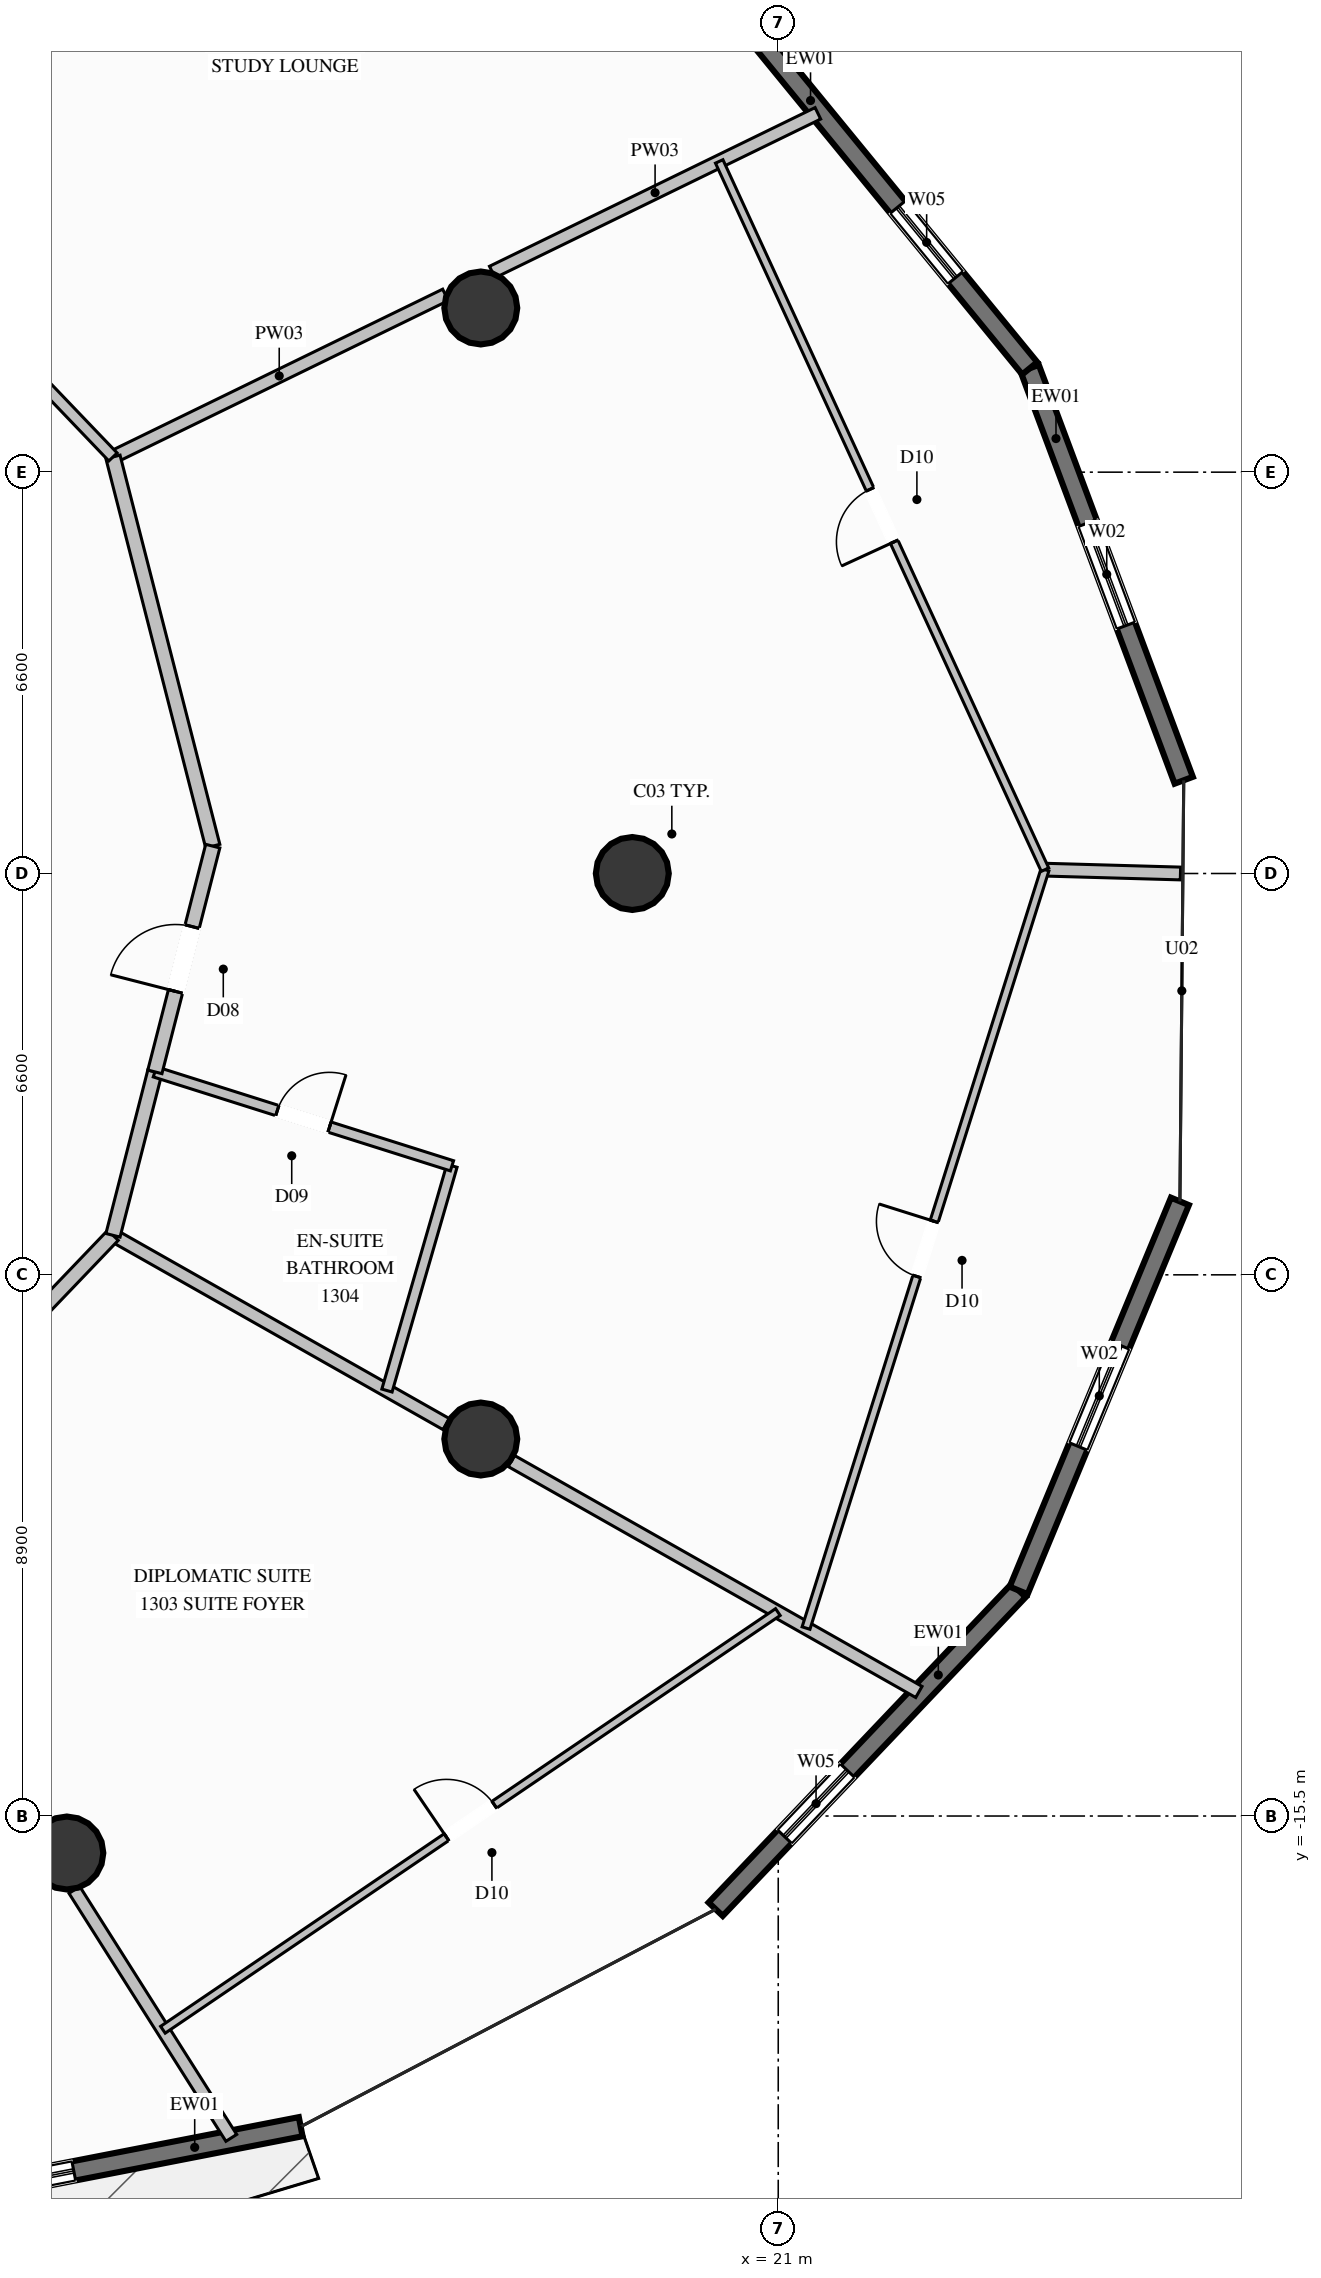
"""IFC4 building model, lengths in metres.
Left out: names, types, materials, properties, quantities, classifications, styles, units other than length and angle.
Written with IfcOpenShell. Run it as: python <this file> out.ifc"""

import sys

from ifc_helpers import new_model, si_unit, direction, frame, frame_2d, origin, origin_2d, place, context, subcontext, project, spatial, rectangle, circle, extrude, element, fill, save


model = new_model("IFC4")
c1 = context("Model", 3, precision=1e-05, world=origin(), true_north=direction((0.0, 1.0)))
c2 = subcontext(c1, "Body", "Model", "MODEL_VIEW")
j1 = project(units=[si_unit("LENGTHUNIT", "METRE"), si_unit("PLANEANGLEUNIT", "RADIAN")], contexts=[c1])
p1 = place(None, origin())
s1 = spatial("IfcSite", under=j1, at=p1, CompositionType="ELEMENT")
p2 = place(p1, origin())
s2 = spatial("IfcBuilding", under=s1, at=p2, CompositionType="ELEMENT")
p3 = place(p2, frame((0.0, 0.0, 50.0)))
s3 = spatial("IfcBuildingStorey", under=s2, at=p3, CompositionType="ELEMENT", Elevation=50.0)
for number, where, z_axis, x_axis in (
    (1, (18.6, 0.0, 0.0), (0.0, 0.0, 1.0), (1.0, 0.0, 0.0)),
    (2, (16.108, 9.3, 0.0), (0.0, 0.0, 1.0), (1.0, 0.0, 0.0)),
    (3, (9.3, -16.108, 0.0), (0.0, 0.0, 1.0), (1.0, 0.0, 0.0)),
    (4, (16.108, -9.3, 0.0), (0.0, 0.0, 1.0), (1.0, 0.0, 0.0)),
):
    element("IfcColumn", number, at=place(p3, frame(where, z_axis=z_axis, x_axis=x_axis)), inside=s3, PredefinedType="COLUMN", context=c2, shape_type="SweptSolid", body=[
        extrude(circle(Radius=0.6, at=origin_2d()), origin(), (0.0, 0.0, 1.0), 3.6),
    ])
p4 = place(p3, frame((25.136, 8.308, 0.0), z_axis=(0.0, 0.0, 1.0), x_axis=(0.350187429463, -0.936679648677, 0.0)))
e5 = element("IfcWall", 5, at=p4, inside=s3, PredefinedType="SOLIDWALL", context=c2, shape_type="SweptSolid", body=[
    extrude(rectangle(XDim=7.233, YDim=0.32, at=frame_2d((3.617, 0.0))), origin(), (0.0, 0.0, 1.0), 3.34),
])
p5 = place(p4, frame((2.717, 0.0, 0.35)))
e6 = element("IfcOpeningElement", 6, at=p5, cuts=e5, PredefinedType="OPENING", context=c2, shape_type="SweptSolid", body=[
    extrude(rectangle(XDim=1.8, YDim=2.6, at=frame_2d((0.9, 1.3))), frame((0.0, 0.17, 0.0), z_axis=(0.0, -1.0, 0.0), x_axis=(1.0, 0.0, 0.0)), (0.0, 0.0, 1.0), 0.34),
])
p6 = place(p3, frame((20.255, 14.27, 0.0), z_axis=(0.0, 0.0, 1.0), x_axis=(0.633484495702, -0.773755383636, 0.0)))
e7 = element("IfcWall", 7, at=p6, inside=s3, PredefinedType="SOLIDWALL", context=c2, shape_type="SweptSolid", body=[
    extrude(rectangle(XDim=7.705, YDim=0.32, at=frame_2d((3.853, 0.0))), origin(), (0.0, 0.0, 1.0), 3.34),
])
p7 = place(p6, frame((4.279, 0.0, 0.85)))
e8 = element("IfcOpeningElement", 8, at=p7, cuts=e7, PredefinedType="OPENING", context=c2, shape_type="SweptSolid", body=[
    extrude(rectangle(XDim=1.5, YDim=1.2, at=frame_2d((0.75, 0.6))), frame((0.0, 0.17, 0.0), z_axis=(0.0, -1.0, 0.0), x_axis=(1.0, 0.0, 0.0)), (0.0, 0.0, 1.0), 0.34),
])
p8 = place(p3, frame((13.146, -20.609, 0.0), z_axis=(0.0, 0.0, 1.0), x_axis=(-0.981529850993, -0.191309047382, 0.0)))
e9 = element("IfcWall", 9, at=p8, inside=s3, PredefinedType="SOLIDWALL", context=c2, shape_type="SweptSolid", body=[
    extrude(rectangle(XDim=8.15, YDim=0.32, at=frame_2d((4.075, 0.0))), origin(), (0.0, 0.0, 1.0), 3.34),
])
p9 = place(p8, frame((3.802, 0.0, 0.35)))
e10 = element("IfcOpeningElement", 10, at=p9, cuts=e9, PredefinedType="OPENING", context=c2, shape_type="SweptSolid", body=[
    extrude(rectangle(XDim=1.8, YDim=2.6, at=frame_2d((0.9, 1.3))), frame((0.0, 0.17, 0.0), z_axis=(0.0, -1.0, 0.0), x_axis=(1.0, 0.0, 0.0)), (0.0, 0.0, 1.0), 0.34),
])
p10 = place(p3, frame((24.954, -11.79, 0.0), z_axis=(0.0, 0.0, 1.0), x_axis=(-0.688922418365, -0.724835085708, 0.0)))
e11 = element("IfcWall", 11, at=p10, inside=s3, PredefinedType="SOLIDWALL", context=c2, shape_type="SweptSolid", body=[
    extrude(rectangle(XDim=7.233, YDim=0.32, at=frame_2d((3.617, 0.0))), origin(), (0.0, 0.0, 1.0), 3.34),
])
p11 = place(p10, frame((4.087, 0.0, 0.85)))
e12 = element("IfcOpeningElement", 12, at=p11, cuts=e11, PredefinedType="OPENING", context=c2, shape_type="SweptSolid", body=[
    extrude(rectangle(XDim=1.5, YDim=1.2, at=frame_2d((0.75, 0.6))), frame((0.0, 0.17, 0.0), z_axis=(0.0, -1.0, 0.0), x_axis=(1.0, 0.0, 0.0)), (0.0, 0.0, 1.0), 0.34),
])
p12 = place(p3, frame((27.606, -5.392, 0.0), z_axis=(0.0, 0.0, 1.0), x_axis=(-0.382897635177, -0.923790777707, 0.0)))
e13 = element("IfcWall", 13, at=p12, inside=s3, PredefinedType="SOLIDWALL", context=c2, shape_type="SweptSolid", body=[
    extrude(rectangle(XDim=6.926, YDim=0.32, at=frame_2d((3.463, 0.0))), origin(), (0.0, 0.0, 1.0), 3.34),
])
p13 = place(p12, frame((2.563, 0.0, 0.35)))
e14 = element("IfcOpeningElement", 14, at=p13, cuts=e13, PredefinedType="OPENING", context=c2, shape_type="SweptSolid", body=[
    extrude(rectangle(XDim=1.8, YDim=2.6, at=frame_2d((0.9, 1.3))), frame((0.0, 0.17, 0.0), z_axis=(0.0, -1.0, 0.0), x_axis=(1.0, 0.0, 0.0)), (0.0, 0.0, 1.0), 0.34),
])
p14 = place(p3, frame((10.059, 6.85, 0.0), z_axis=(0.0, 0.0, 1.0), x_axis=(0.898932322455, 0.438087525097, 0.0)))
e15 = element("IfcWall", 15, at=p14, inside=s3, PredefinedType="PARTITIONING", context=c2, shape_type="SweptSolid", body=[
    extrude(rectangle(XDim=6.083, YDim=0.21, at=frame_2d((3.042, 0.0))), origin(), (0.0, 0.0, 1.0), 2.708),
])
p15 = place(p3, frame((16.297, 9.891, 0.0), z_axis=(0.0, 0.0, 1.0), x_axis=(0.898922003025, 0.438108699386, 0.0)))
e16 = element("IfcWall", 16, at=p15, inside=s3, PredefinedType="PARTITIONING", context=c2, shape_type="SweptSolid", body=[
    extrude(rectangle(XDim=5.957, YDim=0.21, at=frame_2d((2.979, 0.0))), origin(), (0.0, 0.0, 1.0), 3.34),
])
p16 = place(p3, frame((9.424, -16.715, 0.0), z_axis=(0.0, 0.0, 1.0), x_axis=(0.534778847244, -0.844992061821, 0.0)))
e17 = element("IfcWall", 17, at=p16, inside=s3, PredefinedType="PARTITIONING", context=c2, shape_type="SweptSolid", body=[
    extrude(rectangle(XDim=4.826, YDim=0.21, at=frame_2d((2.413, 0.0))), origin(), (0.0, 0.0, 1.0), 3.34),
])
p17 = place(p3, frame((10.059, -5.95, 0.0), z_axis=(0.0, 0.0, 1.0), x_axis=(0.870045461468, -0.492971495097, 0.0)))
e18 = element("IfcWall", 18, at=p17, inside=s3, PredefinedType="PARTITIONING", context=c2, shape_type="SweptSolid", body=[
    extrude(rectangle(XDim=6.299, YDim=0.21, at=frame_2d((3.149, 0.0))), origin(), (0.0, 0.0, 1.0), 2.708),
])
p18 = place(p3, frame((16.611, -9.662, 0.0), z_axis=(0.0, 0.0, 1.0), x_axis=(0.870016294914, -0.493022967603, 0.0)))
e19 = element("IfcWall", 19, at=p18, inside=s3, PredefinedType="PARTITIONING", context=c2, shape_type="SweptSolid", body=[
    extrude(rectangle(XDim=7.703, YDim=0.21, at=frame_2d((3.852, 0.0))), origin(), (0.0, 0.0, 1.0), 3.34),
])
p19 = place(p3, frame((5.575, -10.635, 0.0), z_axis=(0.0, 0.0, 1.0), x_axis=(0.691445702336, 0.722428432941, 0.0)))
e20 = element("IfcWall", 20, at=p19, inside=s3, PredefinedType="PARTITIONING", context=c2, shape_type="SweptSolid", body=[
    extrude(rectangle(XDim=6.485, YDim=0.24, at=frame_2d((3.243, 0.0))), origin(), (0.0, 0.0, 1.0), 3.34),
])
p20 = place(p3, frame((10.88, -19.015, 0.0), z_axis=(0.0, 0.0, 1.0), x_axis=(0.827254691241, 0.561827087119, 0.0)))
e21 = element("IfcWall", 21, at=p20, inside=s3, PredefinedType="PARTITIONING", context=c2, shape_type="SweptSolid", body=[
    extrude(rectangle(XDim=12.226, YDim=0.135, at=frame_2d((6.113, 0.0))), origin(), (0.0, 0.0, 1.0), 3.34),
])
p21 = place(p20, frame((5.638, 0.0, 0.0)))
e22 = element("IfcOpeningElement", 22, at=p21, cuts=e21, PredefinedType="OPENING", context=c2, shape_type="SweptSolid", body=[
    extrude(rectangle(XDim=0.95, YDim=2.1, at=frame_2d((0.475, 1.05))), frame((0.0, 0.078, 0.0), z_axis=(0.0, -1.0, 0.0), x_axis=(1.0, 0.0, 0.0)), (0.0, 0.0, 1.0), 0.155),
])
p22 = place(p3, frame((10.059, -5.95, 0.0), z_axis=(0.0, 0.0, 1.0), x_axis=(0.248286444079, 0.968686658154, 0.0)))
e23 = element("IfcWall", 23, at=p22, inside=s3, PredefinedType="PARTITIONING", context=c2, shape_type="SweptSolid", body=[
    extrude(rectangle(XDim=2.775, YDim=0.24, at=frame_2d((1.387, 0.0))), origin(), (0.0, 0.0, 1.0), 3.34),
])
p23 = place(p3, frame((14.565, -8.503, 0.0), z_axis=(0.0, 0.0, 1.0), x_axis=(0.277862399165, 0.960620886266, 0.0)))
e24 = element("IfcWall", 24, at=p23, inside=s3, PredefinedType="PLUMBINGWALL", context=c2, shape_type="SweptSolid", body=[
    extrude(rectangle(XDim=3.848, YDim=0.175, at=frame_2d((1.924, 0.0))), origin(), (0.0, 0.0, 1.0), 3.34),
])
p24 = place(p3, frame((10.748, -3.262, 0.0), z_axis=(0.0, 0.0, 1.0), x_axis=(0.953471714391, -0.301482486817, 0.0)))
e25 = element("IfcWall", 25, at=p24, inside=s3, PredefinedType="PLUMBINGWALL", context=c2, shape_type="SweptSolid", body=[
    extrude(rectangle(XDim=5.125, YDim=0.175, at=frame_2d((2.562, 0.0))), origin(), (0.0, 0.0, 1.0), 3.34),
])
p25 = place(p24, frame((2.112, 0.0, 0.0)))
e26 = element("IfcOpeningElement", 26, at=p25, cuts=e25, PredefinedType="OPENING", context=c2, shape_type="SweptSolid", body=[
    extrude(rectangle(XDim=0.9, YDim=2.1, at=frame_2d((0.45, 1.05))), frame((0.0, 0.098, 0.0), z_axis=(0.0, -1.0, 0.0), x_axis=(1.0, 0.0, 0.0)), (0.0, 0.0, 1.0), 0.195),
])
p26 = place(p3, frame((25.387, 0.063, 0.0), z_axis=(0.0, 0.0, 1.0), x_axis=(0.999600618216, -0.028259583552, 0.0)))
e27 = element("IfcWall", 27, at=p26, inside=s3, PredefinedType="PARTITIONING", context=c2, shape_type="SweptSolid", body=[
    extrude(rectangle(XDim=2.229, YDim=0.21, at=frame_2d((1.115, 0.0))), origin(), (0.0, 0.0, 1.0), 2.419),
])
p27 = place(p3, frame((11.7, 0.45, 0.0), z_axis=(0.0, 0.0, 1.0), x_axis=(-0.248347790771, 0.968670932164, 0.0)))
e28 = element("IfcWall", 28, at=p27, inside=s3, PredefinedType="PARTITIONING", context=c2, shape_type="SweptSolid", body=[
    extrude(rectangle(XDim=6.607, YDim=0.24, at=frame_2d((3.304, 0.0))), origin(), (0.0, 0.0, 1.0), 2.919),
])
p28 = place(p3, frame((10.748, -3.262, 0.0), z_axis=(0.0, 0.0, 1.0), x_axis=(0.248407539497, 0.968655611826, 0.0)))
e29 = element("IfcWall", 29, at=p28, inside=s3, PredefinedType="PARTITIONING", context=c2, shape_type="SweptSolid", body=[
    extrude(rectangle(XDim=3.832, YDim=0.24, at=frame_2d((1.916, 0.0))), origin(), (0.0, 0.0, 1.0), 2.919),
])
p29 = place(p28, frame((1.366, 0.0, 0.0)))
e30 = element("IfcOpeningElement", 30, at=p29, cuts=e29, PredefinedType="OPENING", context=c2, shape_type="SweptSolid", body=[
    extrude(rectangle(XDim=1.1, YDim=2.3, at=frame_2d((0.55, 1.15))), frame((0.0, 0.13, 0.0), z_axis=(0.0, -1.0, 0.0), x_axis=(1.0, 0.0, 0.0)), (0.0, 0.0, 1.0), 0.26),
])
p30 = place(p3, frame((21.457, -12.409, 0.0), z_axis=(0.0, 0.0, 1.0), x_axis=(0.300535318397, 0.953770686484, 0.0)))
e31 = element("IfcWall", 31, at=p30, inside=s3, PredefinedType="PARTITIONING", context=c2, shape_type="SweptSolid", body=[
    extrude(rectangle(XDim=13.076, YDim=0.135, at=frame_2d((6.538, 0.0))), origin(), (0.0, 0.0, 1.0), 2.807),
])
p31 = place(p30, frame((6.063, 0.0, 0.0)))
e32 = element("IfcOpeningElement", 32, at=p31, cuts=e31, PredefinedType="OPENING", context=c2, shape_type="SweptSolid", body=[
    extrude(rectangle(XDim=0.95, YDim=2.1, at=frame_2d((0.475, 1.05))), frame((0.0, 0.078, 0.0), z_axis=(0.0, -1.0, 0.0), x_axis=(1.0, 0.0, 0.0)), (0.0, 0.0, 1.0), 0.155),
])
p32 = place(p3, frame((25.387, 0.063, 0.0), z_axis=(0.0, 0.0, 1.0), x_axis=(-0.417925097851, 0.9084814872, 0.0)))
e33 = element("IfcWall", 33, at=p32, inside=s3, PredefinedType="PARTITIONING", context=c2, shape_type="SweptSolid", body=[
    extrude(rectangle(XDim=12.82, YDim=0.135, at=frame_2d((6.41, 0.0))), origin(), (0.0, 0.0, 1.0), 2.807),
])
p33 = place(p32, frame((5.935, 0.0, 0.0)))
e34 = element("IfcOpeningElement", 34, at=p33, cuts=e33, PredefinedType="OPENING", context=c2, shape_type="SweptSolid", body=[
    extrude(rectangle(XDim=0.95, YDim=2.1, at=frame_2d((0.475, 1.05))), frame((0.0, 0.078, 0.0), z_axis=(0.0, -1.0, 0.0), x_axis=(1.0, 0.0, 0.0)), (0.0, 0.0, 1.0), 0.155),
])
p34 = place(p3, frame((10.059, 6.85, 0.0), z_axis=(0.0, 0.0, 1.0), x_axis=(-0.691464507588, 0.722410433719, 0.0)))
e35 = element("IfcWall", 35, at=p34, inside=s3, PredefinedType="PARTITIONING", context=c2, shape_type="SweptSolid", body=[
    extrude(rectangle(XDim=6.485, YDim=0.19, at=frame_2d((3.242, 0.0))), origin(), (0.0, 0.0, 1.0), 3.34),
])
p35 = place(p34, frame((2.768, 0.0, 0.0)))
e36 = element("IfcOpeningElement", 36, at=p35, cuts=e35, PredefinedType="OPENING", context=c2, shape_type="SweptSolid", body=[
    extrude(rectangle(XDim=0.95, YDim=2.1, at=frame_2d((0.475, 1.05))), frame((0.0, 0.105, 0.0), z_axis=(0.0, -1.0, 0.0), x_axis=(1.0, 0.0, 0.0)), (0.0, 0.0, 1.0), 0.21),
])
p36 = place(p5, origin())
e37 = element("IfcWindow", 37, at=p36, inside=s3, PartitioningType="SINGLE_PANEL", PredefinedType="WINDOW", context=c2, shape_type="SweptSolid", body=[
    extrude(rectangle(XDim=1.8, YDim=2.6, at=frame_2d((0.9, 1.3))), frame((0.0, 0.03, 0.0), z_axis=(0.0, -1.0, 0.0), x_axis=(1.0, 0.0, 0.0)), (0.0, 0.0, 1.0), 0.06),
])
fill(e6, e37)
p37 = place(p7, origin())
e38 = element("IfcWindow", 38, at=p37, inside=s3, PartitioningType="SINGLE_PANEL", PredefinedType="WINDOW", context=c2, shape_type="SweptSolid", body=[
    extrude(rectangle(XDim=1.5, YDim=1.2, at=frame_2d((0.75, 0.6))), frame((0.0, 0.03, 0.0), z_axis=(0.0, -1.0, 0.0), x_axis=(1.0, 0.0, 0.0)), (0.0, 0.0, 1.0), 0.06),
])
fill(e8, e38)
p38 = place(p9, origin())
e39 = element("IfcWindow", 39, at=p38, inside=s3, PartitioningType="SINGLE_PANEL", PredefinedType="WINDOW", context=c2, shape_type="SweptSolid", body=[
    extrude(rectangle(XDim=1.8, YDim=2.6, at=frame_2d((0.9, 1.3))), frame((0.0, 0.03, 0.0), z_axis=(0.0, -1.0, 0.0), x_axis=(1.0, 0.0, 0.0)), (0.0, 0.0, 1.0), 0.06),
])
fill(e10, e39)
p39 = place(p11, origin())
e40 = element("IfcWindow", 40, at=p39, inside=s3, PartitioningType="SINGLE_PANEL", PredefinedType="WINDOW", context=c2, shape_type="SweptSolid", body=[
    extrude(rectangle(XDim=1.5, YDim=1.2, at=frame_2d((0.75, 0.6))), frame((0.0, 0.03, 0.0), z_axis=(0.0, -1.0, 0.0), x_axis=(1.0, 0.0, 0.0)), (0.0, 0.0, 1.0), 0.06),
])
fill(e12, e40)
p40 = place(p13, origin())
e41 = element("IfcWindow", 41, at=p40, inside=s3, PartitioningType="SINGLE_PANEL", PredefinedType="WINDOW", context=c2, shape_type="SweptSolid", body=[
    extrude(rectangle(XDim=1.8, YDim=2.6, at=frame_2d((0.9, 1.3))), frame((0.0, 0.03, 0.0), z_axis=(0.0, -1.0, 0.0), x_axis=(1.0, 0.0, 0.0)), (0.0, 0.0, 1.0), 0.06),
])
fill(e14, e41)
p41 = place(p21, origin())
e42 = element("IfcDoor", 42, at=p41, inside=s3, OperationType="SINGLE_SWING_LEFT", PredefinedType="DOOR", context=c2, shape_type="SweptSolid", body=[
    extrude(rectangle(XDim=0.95, YDim=2.1, at=frame_2d((0.475, 1.05))), frame((0.0, 0.025, 0.0), z_axis=(0.0, -1.0, 0.0), x_axis=(1.0, 0.0, 0.0)), (0.0, 0.0, 1.0), 0.05),
])
fill(e22, e42)
p42 = place(p25, origin())
e43 = element("IfcDoor", 43, at=p42, inside=s3, OperationType="SINGLE_SWING_RIGHT", PredefinedType="DOOR", context=c2, shape_type="SweptSolid", body=[
    extrude(rectangle(XDim=0.9, YDim=2.1, at=frame_2d((0.45, 1.05))), frame((0.0, 0.025, 0.0), z_axis=(0.0, -1.0, 0.0), x_axis=(1.0, 0.0, 0.0)), (0.0, 0.0, 1.0), 0.05),
])
fill(e26, e43)
p43 = place(p29, origin())
e44 = element("IfcDoor", 44, at=p43, inside=s3, OperationType="SINGLE_SWING_LEFT", PredefinedType="DOOR", context=c2, shape_type="SweptSolid", body=[
    extrude(rectangle(XDim=1.1, YDim=2.3, at=frame_2d((0.55, 1.15))), frame((0.0, 0.025, 0.0), z_axis=(0.0, -1.0, 0.0), x_axis=(1.0, 0.0, 0.0)), (0.0, 0.0, 1.0), 0.05),
])
fill(e30, e44)
p44 = place(p31, origin())
e45 = element("IfcDoor", 45, at=p44, inside=s3, OperationType="SINGLE_SWING_RIGHT", PredefinedType="DOOR", context=c2, shape_type="SweptSolid", body=[
    extrude(rectangle(XDim=0.95, YDim=2.1, at=frame_2d((0.475, 1.05))), frame((0.0, 0.025, 0.0), z_axis=(0.0, -1.0, 0.0), x_axis=(1.0, 0.0, 0.0)), (0.0, 0.0, 1.0), 0.05),
])
fill(e32, e45)
p45 = place(p33, origin())
e46 = element("IfcDoor", 46, at=p45, inside=s3, OperationType="SINGLE_SWING_LEFT", PredefinedType="DOOR", context=c2, shape_type="SweptSolid", body=[
    extrude(rectangle(XDim=0.95, YDim=2.1, at=frame_2d((0.475, 1.05))), frame((0.0, 0.025, 0.0), z_axis=(0.0, -1.0, 0.0), x_axis=(1.0, 0.0, 0.0)), (0.0, 0.0, 1.0), 0.05),
])
fill(e34, e46)
save(model, sys.argv[1])
